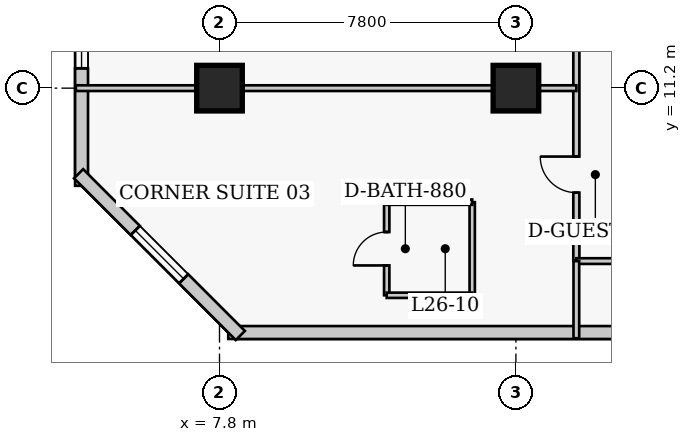
"""IFC4 building model, lengths in metres.
Left out: names, types, materials, properties, quantities, classifications, styles, units other than length and angle.
Written with IfcOpenShell. Run it as: python <this file> out.ifc"""

import sys

from ifc_helpers import new_model, si_unit, direction, frame, frame_2d, origin, origin_2d, place, context, subcontext, project, spatial, rectangle, extrude, element, fill, save


model = new_model("IFC4")
c1 = context("Model", 3, precision=1e-05, world=origin(), true_north=direction((0.0, 1.0)))
c2 = subcontext(c1, "Body", "Model", "MODEL_VIEW")
j1 = project(units=[si_unit("LENGTHUNIT", "METRE"), si_unit("PLANEANGLEUNIT", "RADIAN")], contexts=[c1])
p1 = place(None, origin())
s1 = spatial("IfcSite", under=j1, at=p1, CompositionType="ELEMENT")
p2 = place(p1, origin())
s2 = spatial("IfcBuilding", under=s1, at=p2, CompositionType="ELEMENT")
p3 = place(p2, frame((0.0, 0.0, 107.0)))
s3 = spatial("IfcBuildingStorey", under=s2, at=p3, CompositionType="ELEMENT", Elevation=107.0)
for number, where, z_axis, x_axis in (
    (1, (7.8, 11.2, 0.0), (0.0, 0.0, 1.0), (1.0, 0.0, 0.0)),
    (2, (15.6, 11.2, 0.0), (0.0, 0.0, 1.0), (1.0, 0.0, 0.0)),
):
    element("IfcColumn", number, at=place(p3, frame(where, z_axis=z_axis, x_axis=x_axis)), inside=s3, PredefinedType="COLUMN", context=c2, shape_type="SweptSolid", body=[
        extrude(rectangle(XDim=1.2, YDim=1.2, at=origin_2d()), origin(), (0.0, 0.0, 1.0), 3.8),
    ])
p4 = place(p3, frame((8.03, 4.77, 0.0), z_axis=(0.0, 0.0, 1.0), x_axis=(1.0, 0.0, 0.0)))
e3 = element("IfcWall", 3, at=p4, inside=s3, PredefinedType="SOLIDWALL", context=c2, shape_type="SweptSolid", body=[
    extrude(rectangle(XDim=28.29, YDim=0.34, at=frame_2d((14.145, 0.0))), origin(), (0.0, 0.0, 1.0), 3.54),
])
p5 = place(p4, frame((12.595, 0.0, 0.85)))
e4 = element("IfcOpeningElement", 4, at=p5, cuts=e3, PredefinedType="OPENING", context=c2, shape_type="SweptSolid", body=[
    extrude(rectangle(XDim=1.8, YDim=1.8, at=frame_2d((0.9, 0.9))), frame((0.0, 0.18, 0.0), z_axis=(0.0, -1.0, 0.0), x_axis=(1.0, 0.0, 0.0)), (0.0, 0.0, 1.0), 0.36),
])
p6 = place(p3, frame((4.17, 40.57, 0.0), z_axis=(0.0, 0.0, 1.0), x_axis=(0.0, -1.0, 0.0)))
e5 = element("IfcWall", 5, at=p6, inside=s3, PredefinedType="SOLIDWALL", context=c2, shape_type="SweptSolid", body=[
    extrude(rectangle(XDim=31.94, YDim=0.34, at=frame_2d((15.97, 0.0))), origin(), (0.0, 0.0, 1.0), 3.54),
])
p7 = place(p6, frame((3.093, 0.0, 0.85)))
e6 = element("IfcOpeningElement", 6, at=p7, cuts=e5, PredefinedType="OPENING", context=c2, shape_type="SweptSolid", body=[
    extrude(rectangle(XDim=1.8, YDim=1.8, at=frame_2d((0.9, 0.9))), frame((0.0, 0.18, 0.0), z_axis=(0.0, -1.0, 0.0), x_axis=(1.0, 0.0, 0.0)), (0.0, 0.0, 1.0), 0.36),
])
p8 = place(p6, frame((12.228, 0.0, 0.85)))
e7 = element("IfcOpeningElement", 7, at=p8, cuts=e5, PredefinedType="OPENING", context=c2, shape_type="SweptSolid", body=[
    extrude(rectangle(XDim=1.8, YDim=1.8, at=frame_2d((0.9, 0.9))), frame((0.0, 0.18, 0.0), z_axis=(0.0, -1.0, 0.0), x_axis=(1.0, 0.0, 0.0)), (0.0, 0.0, 1.0), 0.36),
])
p9 = place(p6, frame((18.413, 0.0, 0.85)))
e8 = element("IfcOpeningElement", 8, at=p9, cuts=e5, PredefinedType="OPENING", context=c2, shape_type="SweptSolid", body=[
    extrude(rectangle(XDim=1.8, YDim=1.8, at=frame_2d((0.9, 0.9))), frame((0.0, 0.18, 0.0), z_axis=(0.0, -1.0, 0.0), x_axis=(1.0, 0.0, 0.0)), (0.0, 0.0, 1.0), 0.36),
])
p10 = place(p6, frame((27.048, 0.0, 0.85)))
e9 = element("IfcOpeningElement", 9, at=p10, cuts=e5, PredefinedType="OPENING", context=c2, shape_type="SweptSolid", body=[
    extrude(rectangle(XDim=1.8, YDim=1.8, at=frame_2d((0.9, 0.9))), frame((0.0, 0.18, 0.0), z_axis=(0.0, -1.0, 0.0), x_axis=(1.0, 0.0, 0.0)), (0.0, 0.0, 1.0), 0.36),
])
p11 = place(p6, frame((7.81, 0.0, 0.85)))
e10 = element("IfcOpeningElement", 10, at=p11, cuts=e5, PredefinedType="OPENING", context=c2, shape_type="SweptSolid", body=[
    extrude(rectangle(XDim=1.3, YDim=1.7, at=frame_2d((0.65, 0.85))), frame((0.0, 0.18, 0.0), z_axis=(0.0, -1.0, 0.0), x_axis=(1.0, 0.0, 0.0)), (0.0, 0.0, 1.0), 0.36),
])
p12 = place(p3, frame((4.092, 8.948, 0.0), z_axis=(0.0, 0.0, 1.0), x_axis=(0.707106781187, -0.707106781187, 0.0)))
e11 = element("IfcWall", 11, at=p12, inside=s3, PredefinedType="SOLIDWALL", context=c2, shape_type="SweptSolid", body=[
    extrude(rectangle(XDim=6.02, YDim=0.34, at=frame_2d((3.01, 0.0))), origin(), (0.0, 0.0, 1.0), 3.54),
])
p13 = place(p12, frame((2.11, 0.0, 0.85)))
e12 = element("IfcOpeningElement", 12, at=p13, cuts=e11, PredefinedType="OPENING", context=c2, shape_type="SweptSolid", body=[
    extrude(rectangle(XDim=1.8, YDim=1.8, at=frame_2d((0.9, 0.9))), frame((0.0, 0.18, 0.0), z_axis=(0.0, -1.0, 0.0), x_axis=(1.0, 0.0, 0.0)), (0.0, 0.0, 1.0), 0.36),
])
p14 = place(p3, frame((17.19, 6.65, 0.0), z_axis=(0.0, 0.0, 1.0), x_axis=(0.0, 1.0, 0.0)))
e13 = element("IfcWall", 13, at=p14, inside=s3, PredefinedType="PARTITIONING", context=c2, shape_type="SweptSolid", body=[
    extrude(rectangle(XDim=34.0, YDim=0.16, at=frame_2d((17.0, 0.0))), origin(), (0.0, 0.0, 1.0), 3.54),
])
p15 = place(p14, frame((1.8, 0.0, 0.0)))
e14 = element("IfcOpeningElement", 14, at=p15, cuts=e13, PredefinedType="OPENING", context=c2, shape_type="SweptSolid", body=[
    extrude(rectangle(XDim=0.95, YDim=2.1, at=frame_2d((0.475, 1.05))), frame((0.0, 0.09, 0.0), z_axis=(0.0, -1.0, 0.0), x_axis=(1.0, 0.0, 0.0)), (0.0, 0.0, 1.0), 0.18),
])
p16 = place(p14, frame((8.475, 0.0, 0.0)))
e15 = element("IfcOpeningElement", 15, at=p16, cuts=e13, PredefinedType="OPENING", context=c2, shape_type="SweptSolid", body=[
    extrude(rectangle(XDim=0.95, YDim=2.1, at=frame_2d((0.475, 1.05))), frame((0.0, 0.09, 0.0), z_axis=(0.0, -1.0, 0.0), x_axis=(1.0, 0.0, 0.0)), (0.0, 0.0, 1.0), 0.18),
])
p17 = place(p14, frame((17.275, 0.0, 0.0)))
e16 = element("IfcOpeningElement", 16, at=p17, cuts=e13, PredefinedType="OPENING", context=c2, shape_type="SweptSolid", body=[
    extrude(rectangle(XDim=0.95, YDim=2.1, at=frame_2d((0.475, 1.05))), frame((0.0, 0.09, 0.0), z_axis=(0.0, -1.0, 0.0), x_axis=(1.0, 0.0, 0.0)), (0.0, 0.0, 1.0), 0.18),
])
p18 = place(p14, frame((24.975, 0.0, 0.0)))
e17 = element("IfcOpeningElement", 17, at=p18, cuts=e13, PredefinedType="OPENING", context=c2, shape_type="SweptSolid", body=[
    extrude(rectangle(XDim=0.95, YDim=2.1, at=frame_2d((0.475, 1.05))), frame((0.0, 0.09, 0.0), z_axis=(0.0, -1.0, 0.0), x_axis=(1.0, 0.0, 0.0)), (0.0, 0.0, 1.0), 0.18),
])
p19 = place(p14, frame((29.3, 0.0, 0.0)))
e18 = element("IfcOpeningElement", 18, at=p19, cuts=e13, PredefinedType="OPENING", context=c2, shape_type="SweptSolid", body=[
    extrude(rectangle(XDim=1.0, YDim=2.15, at=frame_2d((0.5, 1.075))), frame((0.0, 0.09, 0.0), z_axis=(0.0, -1.0, 0.0), x_axis=(1.0, 0.0, 0.0)), (0.0, 0.0, 1.0), 0.18),
])
p20 = place(p3, frame((17.19, 6.65, 0.0), z_axis=(0.0, 0.0, 1.0), x_axis=(1.0, 0.0, 0.0)))
e19 = element("IfcWall", 19, at=p20, inside=s3, PredefinedType="PARTITIONING", context=c2, shape_type="SweptSolid", body=[
    extrude(rectangle(XDim=2.22, YDim=0.15, at=frame_2d((1.11, 0.0))), origin(), (0.0, 0.0, 1.0), 3.54),
])
p21 = place(p3, frame((17.19, 4.62, 0.0), z_axis=(0.0, 0.0, 1.0), x_axis=(0.0, 1.0, 0.0)))
e20 = element("IfcWall", 20, at=p21, inside=s3, PredefinedType="PARTITIONING", context=c2, shape_type="SweptSolid", body=[
    extrude(rectangle(XDim=2.03, YDim=0.15, at=frame_2d((1.015, 0.0))), origin(), (0.0, 0.0, 1.0), 3.54),
])
p22 = place(p3, frame((12.2, 5.75, 0.0), z_axis=(0.0, 0.0, 1.0), x_axis=(0.0, 1.0, 0.0)))
e21 = element("IfcWall", 21, at=p22, inside=s3, PredefinedType="PLUMBINGWALL", context=c2, shape_type="SweptSolid", body=[
    extrude(rectangle(XDim=2.45, YDim=0.14, at=frame_2d((1.225, 0.0))), origin(), (0.0, 0.0, 1.0), 3.54),
])
p23 = place(p22, frame((0.785, 0.0, 0.0)))
e22 = element("IfcOpeningElement", 22, at=p23, cuts=e21, PredefinedType="OPENING", context=c2, shape_type="SweptSolid", body=[
    extrude(rectangle(XDim=0.88, YDim=2.05, at=frame_2d((0.44, 1.025))), frame((0.0, 0.08, 0.0), z_axis=(0.0, -1.0, 0.0), x_axis=(1.0, 0.0, 0.0)), (0.0, 0.0, 1.0), 0.16),
])
p24 = place(p3, frame((14.45, 5.75, 0.0), z_axis=(0.0, 0.0, 1.0), x_axis=(0.0, 1.0, 0.0)))
e23 = element("IfcWall", 23, at=p24, inside=s3, PredefinedType="PLUMBINGWALL", context=c2, shape_type="SweptSolid", body=[
    extrude(rectangle(XDim=2.45, YDim=0.14, at=frame_2d((1.225, 0.0))), origin(), (0.0, 0.0, 1.0), 3.54),
])
for number, where, z_axis, x_axis in (
    (24, (12.2, 5.75, 0.0), (0.0, 0.0, 1.0), (1.0, 0.0, 0.0)),
    (25, (12.2, 8.2, 0.0), (0.0, 0.0, 1.0), (1.0, 0.0, 0.0)),
):
    element("IfcWall", number, at=place(p3, frame(where, z_axis=z_axis, x_axis=x_axis)), inside=s3, PredefinedType="PLUMBINGWALL", context=c2, shape_type="SweptSolid", body=[
        extrude(rectangle(XDim=2.25, YDim=0.14, at=frame_2d((1.125, 0.0))), origin(), (0.0, 0.0, 1.0), 3.54),
    ])
p25 = place(p3, frame((4.02, 11.2, 0.0), z_axis=(0.0, 0.0, 1.0), x_axis=(1.0, 0.0, 0.0)))
e26 = element("IfcWall", 26, at=p25, inside=s3, PredefinedType="PARTITIONING", context=c2, shape_type="SweptSolid", body=[
    extrude(rectangle(XDim=13.17, YDim=0.15, at=frame_2d((6.585, 0.0))), origin(), (0.0, 0.0, 1.0), 2.679),
])
p26 = place(p10, origin())
e27 = element("IfcWindow", 27, at=p26, inside=s3, PartitioningType="SINGLE_PANEL", PredefinedType="WINDOW", context=c2, shape_type="SweptSolid", body=[
    extrude(rectangle(XDim=1.8, YDim=1.8, at=frame_2d((0.9, 0.9))), frame((0.0, 0.03, 0.0), z_axis=(0.0, -1.0, 0.0), x_axis=(1.0, 0.0, 0.0)), (0.0, 0.0, 1.0), 0.06),
])
fill(e9, e27)
p27 = place(p13, origin())
e28 = element("IfcWindow", 28, at=p27, inside=s3, PartitioningType="SINGLE_PANEL", PredefinedType="WINDOW", context=c2, shape_type="SweptSolid", body=[
    extrude(rectangle(XDim=1.8, YDim=1.8, at=frame_2d((0.9, 0.9))), frame((0.0, 0.03, 0.0), z_axis=(0.0, -1.0, 0.0), x_axis=(1.0, 0.0, 0.0)), (0.0, 0.0, 1.0), 0.06),
])
fill(e12, e28)
p28 = place(p23, origin())
e29 = element("IfcDoor", 29, at=p28, inside=s3, OperationType="SINGLE_SWING_LEFT", PredefinedType="DOOR", context=c2, shape_type="SweptSolid", body=[
    extrude(rectangle(XDim=0.88, YDim=2.05, at=frame_2d((0.44, 1.025))), frame((0.0, 0.025, 0.0), z_axis=(0.0, -1.0, 0.0), x_axis=(1.0, 0.0, 0.0)), (0.0, 0.0, 1.0), 0.05),
])
fill(e22, e29)
p29 = place(p15, origin())
e30 = element("IfcDoor", 30, at=p29, inside=s3, OperationType="SINGLE_SWING_RIGHT", PredefinedType="DOOR", context=c2, shape_type="SweptSolid", body=[
    extrude(rectangle(XDim=0.95, YDim=2.1, at=frame_2d((0.475, 1.05))), frame((0.0, 0.025, 0.0), z_axis=(0.0, -1.0, 0.0), x_axis=(1.0, 0.0, 0.0)), (0.0, 0.0, 1.0), 0.05),
])
fill(e14, e30)
save(model, sys.argv[1])
